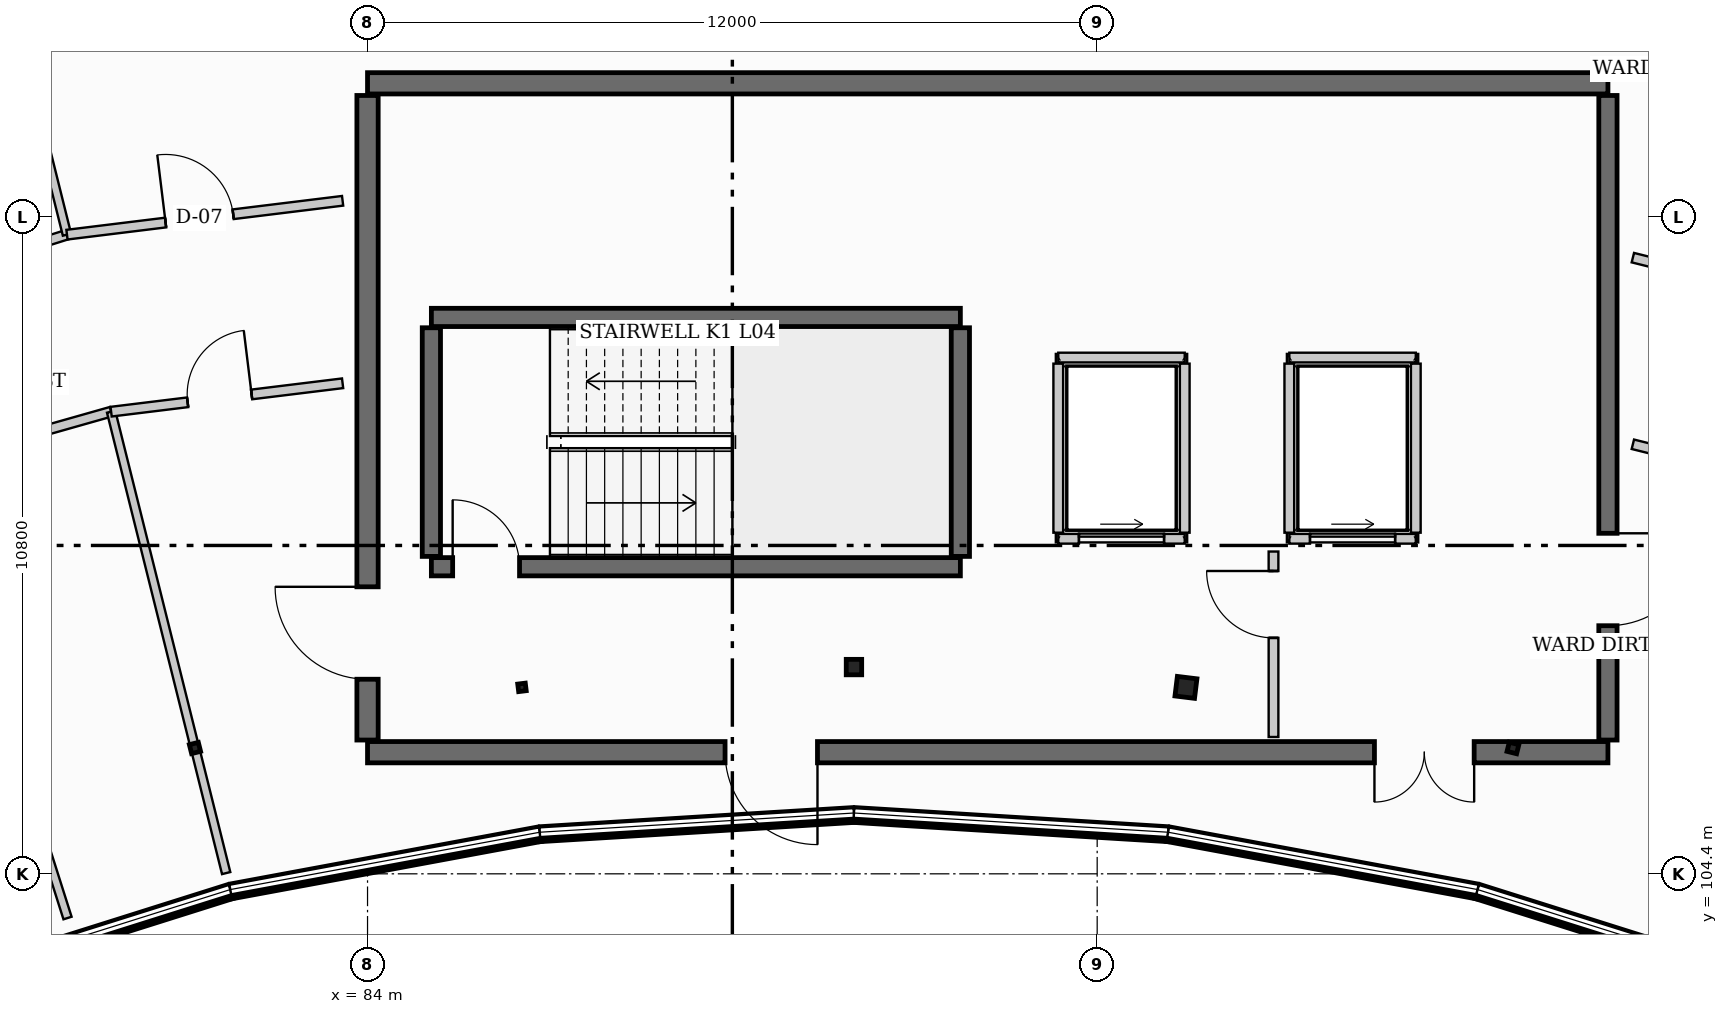
"""IFC4 building model, lengths in metres.
Left out: names, types, materials, properties, quantities, classifications, styles, units other than length and angle.
Written with IfcOpenShell. Run it as: python <this file> out.ifc"""

import sys

from ifc_helpers import new_model, si_unit, direction, frame, frame_2d, origin, origin_2d, place, context, subcontext, project, spatial, rectangle, hollow_rectangle, hollow_circle, i_section, extrude, element, fill, save


model = new_model("IFC4")
c1 = context("Model", 3, precision=1e-05, world=origin(), true_north=direction((0.0, 1.0)))
c2 = subcontext(c1, "Body", "Model", "MODEL_VIEW")
j1 = project(units=[si_unit("LENGTHUNIT", "METRE"), si_unit("PLANEANGLEUNIT", "RADIAN")], contexts=[c1])
p1 = place(None, origin())
s1 = spatial("IfcSite", under=j1, at=p1, CompositionType="ELEMENT")
p2 = place(p1, origin())
s2 = spatial("IfcBuilding", under=s1, at=p2, CompositionType="ELEMENT")
p3 = place(p2, frame((0.0, 0.0, 18.3)))
s3 = spatial("IfcBuildingStorey", under=s2, at=p3, CompositionType="ELEMENT", Elevation=18.3)
p4 = place(p3, frame((81.162, 106.469, 0.0), z_axis=(0.0, 0.0, 1.0), x_axis=(-0.2419218956, 0.970295726276, 0.0)))
e1 = element("IfcColumn", 1, at=p4, inside=s3, PredefinedType="COLUMN", context=c2, shape_type="SweptSolid", body=[
    extrude(i_section(OverallWidth=0.152, OverallDepth=0.152, WebThickness=0.006, FlangeThickness=0.007, at=origin_2d()), origin(), (0.0, 0.0, 1.0), 3.9),
])
p5 = place(p3, frame((86.54, 107.466, 0.0), z_axis=(0.0, 0.0, 1.0), x_axis=(-0.121869343405, 0.992546151641, 0.0)))
e2 = element("IfcColumn", 2, at=p5, inside=s3, PredefinedType="COLUMN", context=c2, shape_type="SweptSolid", body=[
    extrude(hollow_rectangle(XDim=0.125, YDim=0.125, WallThickness=0.006, at=origin_2d()), origin(), (0.0, 0.0, 1.0), 3.9),
])
p6 = place(p3, frame((92.0, 107.8, 0.0), z_axis=(0.0, 0.0, 1.0), x_axis=(0.0, 1.0, 0.0)))
e3 = element("IfcColumn", 3, at=p6, inside=s3, PredefinedType="COLUMN", context=c2, shape_type="SweptSolid", body=[
    extrude(i_section(OverallWidth=0.254, OverallDepth=0.254, WebThickness=0.009, FlangeThickness=0.014, at=origin_2d()), origin(), (0.0, 0.0, 1.0), 3.9),
])
p7 = place(p3, frame((97.46, 107.466, 0.0), z_axis=(0.0, 0.0, 1.0), x_axis=(0.121869343405, 0.992546151641, 0.0)))
e4 = element("IfcColumn", 4, at=p7, inside=s3, PredefinedType="COLUMN", context=c2, shape_type="SweptSolid", body=[
    extrude(hollow_circle(Radius=0.162, WallThickness=0.013, at=origin_2d()), origin(), (0.0, 0.0, 1.0), 3.9),
])
p8 = place(p3, frame((102.838, 106.469, 0.0), z_axis=(0.0, 0.0, 1.0), x_axis=(0.2419218956, 0.970295726276, 0.0)))
e5 = element("IfcColumn", 5, at=p8, inside=s3, PredefinedType="COLUMN", context=c2, shape_type="SweptSolid", body=[
    extrude(i_section(OverallWidth=0.154, OverallDepth=0.162, WebThickness=0.008, FlangeThickness=0.011, at=origin_2d()), origin(), (0.0, 0.0, 1.0), 3.9),
])
p9 = place(p3, frame((84.0, 117.4, 0.0), z_axis=(0.0, 0.0, 1.0), x_axis=(1.0, 0.0, 0.0)))
e6 = element("IfcWall", 6, at=p9, inside=s3, PredefinedType="SHEAR", context=c2, shape_type="SweptSolid", body=[
    extrude(rectangle(XDim=20.4, YDim=0.35, at=frame_2d((10.2, 0.0))), origin(), (0.0, 0.0, 1.0), 3.9),
])
p10 = place(p3, frame((104.4, 106.4, 0.0), z_axis=(0.0, 0.0, 1.0), x_axis=(-1.0, 0.0, 0.0)))
e7 = element("IfcWall", 7, at=p10, inside=s3, PredefinedType="SHEAR", context=c2, shape_type="SweptSolid", body=[
    extrude(rectangle(XDim=20.4, YDim=0.35, at=frame_2d((10.2, 0.0))), origin(), (0.0, 0.0, 1.0), 3.9),
])
p11 = place(p10, frame((2.2, 0.0, 0.0)))
e8 = element("IfcOpeningElement", 8, at=p11, cuts=e7, PredefinedType="OPENING", context=c2, shape_type="SweptSolid", body=[
    extrude(rectangle(XDim=1.64, YDim=2.2, at=frame_2d((0.82, 1.1))), frame((0.0, 0.185, 0.0), z_axis=(0.0, -1.0, 0.0), x_axis=(1.0, 0.0, 0.0)), (0.0, 0.0, 1.0), 0.37),
])
p12 = place(p10, frame((13.0, 0.0, 0.0)))
e9 = element("IfcOpeningElement", 9, at=p12, cuts=e7, PredefinedType="OPENING", context=c2, shape_type="SweptSolid", body=[
    extrude(rectangle(XDim=1.52, YDim=2.16, at=frame_2d((0.76, 1.08))), frame((0.0, 0.185, 0.0), z_axis=(0.0, -1.0, 0.0), x_axis=(1.0, 0.0, 0.0)), (0.0, 0.0, 1.0), 0.37),
])
p13 = place(p3, frame((84.0, 106.6, 0.0), z_axis=(0.0, 0.0, 1.0), x_axis=(0.0, 1.0, 0.0)))
e10 = element("IfcWall", 10, at=p13, inside=s3, PredefinedType="SHEAR", context=c2, shape_type="SweptSolid", body=[
    extrude(rectangle(XDim=10.6, YDim=0.35, at=frame_2d((5.3, 0.0))), origin(), (0.0, 0.0, 1.0), 3.9),
])
p14 = place(p13, frame((1.0, 0.0, 0.0)))
e11 = element("IfcOpeningElement", 11, at=p14, cuts=e10, PredefinedType="OPENING", context=c2, shape_type="SweptSolid", body=[
    extrude(rectangle(XDim=1.52, YDim=2.16, at=frame_2d((0.76, 1.08))), frame((0.0, 0.185, 0.0), z_axis=(0.0, -1.0, 0.0), x_axis=(1.0, 0.0, 0.0)), (0.0, 0.0, 1.0), 0.37),
])
p15 = place(p3, frame((104.4, 117.2, 0.0), z_axis=(0.0, 0.0, 1.0), x_axis=(0.0, -1.0, 0.0)))
e12 = element("IfcWall", 12, at=p15, inside=s3, PredefinedType="SHEAR", context=c2, shape_type="SweptSolid", body=[
    extrude(rectangle(XDim=10.6, YDim=0.3, at=frame_2d((5.3, 0.0))), origin(), (0.0, 0.0, 1.0), 3.9),
])
p16 = place(p15, frame((7.2, 0.0, 0.0)))
e13 = element("IfcOpeningElement", 13, at=p16, cuts=e12, PredefinedType="OPENING", context=c2, shape_type="SweptSolid", body=[
    extrude(rectangle(XDim=1.52, YDim=2.16, at=frame_2d((0.76, 1.08))), frame((0.0, 0.16, 0.0), z_axis=(0.0, -1.0, 0.0), x_axis=(1.0, 0.0, 0.0)), (0.0, 0.0, 1.0), 0.32),
])
p17 = place(p3, frame((85.05, 109.45, 0.0), z_axis=(0.0, 0.0, 1.0), x_axis=(1.0, 0.0, 0.0)))
e14 = element("IfcWall", 14, at=p17, inside=s3, PredefinedType="SHEAR", context=c2, shape_type="SweptSolid", body=[
    extrude(rectangle(XDim=8.7, YDim=0.3, at=frame_2d((4.35, 0.0))), origin(), (0.0, 0.0, 1.0), 3.9),
])
p18 = place(p17, frame((0.35, 0.0, 0.0)))
e15 = element("IfcOpeningElement", 15, at=p18, cuts=e14, PredefinedType="OPENING", context=c2, shape_type="SweptSolid", body=[
    extrude(rectangle(XDim=1.1, YDim=2.15, at=frame_2d((0.55, 1.075))), frame((0.0, 0.16, 0.0), z_axis=(0.0, -1.0, 0.0), x_axis=(1.0, 0.0, 0.0)), (0.0, 0.0, 1.0), 0.32),
])
p19 = place(p3, frame((93.75, 113.55, 0.0), z_axis=(0.0, 0.0, 1.0), x_axis=(-1.0, 0.0, 0.0)))
e16 = element("IfcWall", 16, at=p19, inside=s3, PredefinedType="SHEAR", context=c2, shape_type="SweptSolid", body=[
    extrude(rectangle(XDim=8.7, YDim=0.3, at=frame_2d((4.35, 0.0))), origin(), (0.0, 0.0, 1.0), 3.9),
])
for number, where, z_axis, x_axis in (
    (17, (85.05, 109.62, 0.0), (0.0, 0.0, 1.0), (0.0, 1.0, 0.0)),
    (18, (93.75, 109.62, 0.0), (0.0, 0.0, 1.0), (0.0, 1.0, 0.0)),
):
    element("IfcWall", number, at=place(p3, frame(where, z_axis=z_axis, x_axis=x_axis)), inside=s3, PredefinedType="SHEAR", context=c2, shape_type="SweptSolid", body=[
        extrude(rectangle(XDim=3.76, YDim=0.3, at=frame_2d((1.88, 0.0))), origin(), (0.0, 0.0, 1.0), 3.9),
    ])
p20 = place(p3, frame((81.743, 104.141, 0.0), z_axis=(0.0, 0.0, 1.0), x_axis=(-0.953706582316, -0.300738681994, 0.0)))
e19 = element("IfcWall", 19, at=p20, inside=s3, PredefinedType="STANDARD", context=c2, shape_type="SweptSolid", body=[
    extrude(rectangle(XDim=5.178, YDim=0.22, at=frame_2d((2.589, 0.0))), origin(), (0.0, 0.0, 1.0), 1.05),
])
for number, where, z_axis, x_axis in (
    (20, (86.833, 105.084, 0.0), (0.0, 0.0, 1.0), (-0.983, -0.182, 0.0)),
    (21, (92.0, 105.4, 0.0), (0.0, 0.0, 1.0), (-0.998, -0.061, 0.0)),
    (22, (97.167, 105.084, 0.0), (0.0, 0.0, 1.0), (-0.998, 0.061, 0.0)),
    (23, (102.257, 104.141, 0.0), (0.0, 0.0, 1.0), (-0.983, 0.182, 0.0)),
):
    element("IfcWall", number, at=place(p3, frame(where, z_axis=z_axis, x_axis=x_axis)), inside=s3, PredefinedType="STANDARD", context=c2, shape_type="SweptSolid", body=[
        extrude(rectangle(XDim=5.177, YDim=0.22, at=frame_2d((2.588, 0.0))), origin(), (0.0, 0.0, 1.0), 1.05),
    ])
p21 = place(p3, frame((107.195, 102.584, 0.0), z_axis=(0.0, 0.0, 1.0), x_axis=(-0.953706582316, 0.300738681994, 0.0)))
e24 = element("IfcWall", 24, at=p21, inside=s3, PredefinedType="STANDARD", context=c2, shape_type="SweptSolid", body=[
    extrude(rectangle(XDim=5.178, YDim=0.22, at=frame_2d((2.589, 0.0))), origin(), (0.0, 0.0, 1.0), 1.05),
])
p22 = place(p3, frame((95.36, 109.91, 0.0), z_axis=(0.0, 0.0, 1.0), x_axis=(1.0, 0.0, 0.0)))
e25 = element("IfcWall", 25, at=p22, inside=s3, PredefinedType="PARTITIONING", context=c2, shape_type="SweptSolid", body=[
    extrude(rectangle(XDim=2.08, YDim=0.16, at=frame_2d((1.04, 0.0))), origin(), (0.0, 0.0, 1.0), 3.54),
])
p23 = place(p22, frame((0.34, 0.0, 0.0)))
e26 = element("IfcOpeningElement", 26, at=p23, cuts=e25, PredefinedType="OPENING", context=c2, shape_type="SweptSolid", body=[
    extrude(rectangle(XDim=1.4, YDim=2.2, at=frame_2d((0.7, 1.1))), frame((0.0, 0.09, 0.0), z_axis=(0.0, -1.0, 0.0), x_axis=(1.0, 0.0, 0.0)), (0.0, 0.0, 1.0), 0.18),
])
p24 = place(p3, frame((97.44, 112.89, 0.0), z_axis=(0.0, 0.0, 1.0), x_axis=(-1.0, 0.0, 0.0)))
e27 = element("IfcWall", 27, at=p24, inside=s3, PredefinedType="PARTITIONING", context=c2, shape_type="SweptSolid", body=[
    extrude(rectangle(XDim=2.08, YDim=0.16, at=frame_2d((1.04, 0.0))), origin(), (0.0, 0.0, 1.0), 3.54),
])
for number, where, z_axis, x_axis in (
    (28, (95.36, 112.79, 0.0), (0.0, 0.0, 1.0), (0.0, -1.0, 0.0)),
    (29, (97.44, 110.01, 0.0), (0.0, 0.0, 1.0), (0.0, 1.0, 0.0)),
):
    element("IfcWall", number, at=place(p3, frame(where, z_axis=z_axis, x_axis=x_axis)), inside=s3, PredefinedType="PARTITIONING", context=c2, shape_type="SweptSolid", body=[
        extrude(rectangle(XDim=2.78, YDim=0.16, at=frame_2d((1.39, 0.0))), origin(), (0.0, 0.0, 1.0), 3.54),
    ])
p25 = place(p3, frame((99.16, 109.91, 0.0), z_axis=(0.0, 0.0, 1.0), x_axis=(1.0, 0.0, 0.0)))
e30 = element("IfcWall", 30, at=p25, inside=s3, PredefinedType="PARTITIONING", context=c2, shape_type="SweptSolid", body=[
    extrude(rectangle(XDim=2.08, YDim=0.16, at=frame_2d((1.04, 0.0))), origin(), (0.0, 0.0, 1.0), 3.54),
])
p26 = place(p25, frame((0.34, 0.0, 0.0)))
e31 = element("IfcOpeningElement", 31, at=p26, cuts=e30, PredefinedType="OPENING", context=c2, shape_type="SweptSolid", body=[
    extrude(rectangle(XDim=1.4, YDim=2.2, at=frame_2d((0.7, 1.1))), frame((0.0, 0.09, 0.0), z_axis=(0.0, -1.0, 0.0), x_axis=(1.0, 0.0, 0.0)), (0.0, 0.0, 1.0), 0.18),
])
p27 = place(p3, frame((101.24, 112.89, 0.0), z_axis=(0.0, 0.0, 1.0), x_axis=(-1.0, 0.0, 0.0)))
e32 = element("IfcWall", 32, at=p27, inside=s3, PredefinedType="PARTITIONING", context=c2, shape_type="SweptSolid", body=[
    extrude(rectangle(XDim=2.08, YDim=0.16, at=frame_2d((1.04, 0.0))), origin(), (0.0, 0.0, 1.0), 3.54),
])
for number, where, z_axis, x_axis in (
    (33, (99.16, 112.79, 0.0), (0.0, 0.0, 1.0), (0.0, -1.0, 0.0)),
    (34, (101.24, 110.01, 0.0), (0.0, 0.0, 1.0), (0.0, 1.0, 0.0)),
):
    element("IfcWall", number, at=place(p3, frame(where, z_axis=z_axis, x_axis=x_axis)), inside=s3, PredefinedType="PARTITIONING", context=c2, shape_type="SweptSolid", body=[
        extrude(rectangle(XDim=2.78, YDim=0.16, at=frame_2d((1.39, 0.0))), origin(), (0.0, 0.0, 1.0), 3.54),
    ])
p28 = place(p3, frame((98.9, 106.65, 0.0), z_axis=(0.0, 0.0, 1.0), x_axis=(0.0, 1.0, 0.0)))
e35 = element("IfcWall", 35, at=p28, inside=s3, PredefinedType="PARTITIONING", context=c2, shape_type="SweptSolid", body=[
    extrude(rectangle(XDim=3.05, YDim=0.16, at=frame_2d((1.525, 0.0))), origin(), (0.0, 0.0, 1.0), 3.295),
])
p29 = place(p28, frame((1.63, 0.0, 0.0)))
e36 = element("IfcOpeningElement", 36, at=p29, cuts=e35, PredefinedType="OPENING", context=c2, shape_type="SweptSolid", body=[
    extrude(rectangle(XDim=1.1, YDim=2.15, at=frame_2d((0.55, 1.075))), frame((0.0, 0.09, 0.0), z_axis=(0.0, -1.0, 0.0), x_axis=(1.0, 0.0, 0.0)), (0.0, 0.0, 1.0), 0.18),
])
p30 = place(p3, frame((72.827, 112.947, 0.0), z_axis=(0.0, 0.0, 1.0), x_axis=(0.953736183483, 0.30064479426, 0.0)))
e37 = element("IfcWall", 37, at=p30, inside=s3, PredefinedType="PARTITIONING", context=c2, shape_type="SweptSolid", body=[
    extrude(rectangle(XDim=6.532, YDim=0.16, at=frame_2d((3.266, 0.0))), origin(), (0.0, 0.0, 1.0), 2.933),
])
p31 = place(p30, frame((4.632, 0.0, 0.0)))
e38 = element("IfcOpeningElement", 38, at=p31, cuts=e37, PredefinedType="OPENING", context=c2, shape_type="SweptSolid", body=[
    extrude(rectangle(XDim=1.36, YDim=2.18, at=frame_2d((0.68, 1.09))), frame((0.0, 0.09, 0.0), z_axis=(0.0, -1.0, 0.0), x_axis=(1.0, 0.0, 0.0)), (0.0, 0.0, 1.0), 0.18),
])
p32 = place(p3, frame((79.057, 114.911, 0.0), z_axis=(0.0, 0.0, 1.0), x_axis=(-0.241911207257, 0.970298391117, 0.0)))
e39 = element("IfcWall", 39, at=p32, inside=s3, PredefinedType="PARTITIONING", context=c2, shape_type="SweptSolid", body=[
    extrude(rectangle(XDim=7.82, YDim=0.14, at=frame_2d((3.91, 0.0))), origin(), (0.0, 0.0, 1.0), 2.938),
])
p33 = place(p3, frame((76.697, 111.125, 0.0), z_axis=(0.0, 0.0, 1.0), x_axis=(0.302952343331, -0.95300570705, 0.0)))
e40 = element("IfcWall", 40, at=p33, inside=s3, PredefinedType="PARTITIONING", context=c2, shape_type="SweptSolid", body=[
    extrude(rectangle(XDim=7.819, YDim=0.14, at=frame_2d((3.91, 0.0))), origin(), (0.0, 0.0, 1.0), 3.241),
])
p34 = place(p3, frame((76.697, 111.125, 0.0), z_axis=(0.0, 0.0, 1.0), x_axis=(0.962073473599, 0.272790453274, 0.0)))
e41 = element("IfcWall", 41, at=p34, inside=s3, PredefinedType="PARTITIONING", context=c2, shape_type="SweptSolid", body=[
    extrude(rectangle(XDim=3.208, YDim=0.16, at=frame_2d((1.604, 0.0))), origin(), (0.0, 0.0, 1.0), 2.938),
])
p35 = place(p34, frame((0.45, 0.0, 0.0)))
e42 = element("IfcOpeningElement", 42, at=p35, cuts=e41, PredefinedType="OPENING", context=c2, shape_type="SweptSolid", body=[
    extrude(rectangle(XDim=1.2, YDim=2.12, at=frame_2d((0.6, 1.06))), frame((0.0, 0.09, 0.0), z_axis=(0.0, -1.0, 0.0), x_axis=(1.0, 0.0, 0.0)), (0.0, 0.0, 1.0), 0.18),
])
p36 = place(p3, frame((79.783, 112.0, 0.0), z_axis=(0.0, 0.0, 1.0), x_axis=(0.241947927131, -0.970289235515, 0.0)))
e43 = element("IfcWall", 43, at=p36, inside=s3, PredefinedType="PARTITIONING", context=c2, shape_type="SweptSolid", body=[
    extrude(rectangle(XDim=7.82, YDim=0.14, at=frame_2d((3.91, 0.0))), origin(), (0.0, 0.0, 1.0), 2.938),
])
p37 = place(p3, frame((79.057, 114.911, 0.0), z_axis=(0.0, 0.0, 1.0), x_axis=(0.992532332473, 0.121981838793, 0.0)))
e44 = element("IfcWall", 44, at=p37, inside=s3, PredefinedType="PARTITIONING", context=c2, shape_type="SweptSolid", body=[
    extrude(rectangle(XDim=4.567, YDim=0.16, at=frame_2d((2.284, 0.0))), origin(), (0.0, 0.0, 1.0), 2.938),
])
p38 = place(p37, frame((1.634, 0.0, 0.0)))
e45 = element("IfcOpeningElement", 45, at=p38, cuts=e44, PredefinedType="OPENING", context=c2, shape_type="SweptSolid", body=[
    extrude(rectangle(XDim=1.12, YDim=2.08, at=frame_2d((0.56, 1.04))), frame((0.0, 0.09, 0.0), z_axis=(0.0, -1.0, 0.0), x_axis=(1.0, 0.0, 0.0)), (0.0, 0.0, 1.0), 0.18),
])
p39 = place(p3, frame((79.783, 112.0, 0.0), z_axis=(0.0, 0.0, 1.0), x_axis=(0.992559253302, 0.121762591482, 0.0)))
e46 = element("IfcWall", 46, at=p39, inside=s3, PredefinedType="PARTITIONING", context=c2, shape_type="SweptSolid", body=[
    extrude(rectangle(XDim=3.836, YDim=0.16, at=frame_2d((1.918, 0.0))), origin(), (0.0, 0.0, 1.0), 2.938),
])
p40 = place(p39, frame((1.268, 0.0, 0.0)))
e47 = element("IfcOpeningElement", 47, at=p40, cuts=e46, PredefinedType="OPENING", context=c2, shape_type="SweptSolid", body=[
    extrude(rectangle(XDim=1.06, YDim=2.1, at=frame_2d((0.53, 1.05))), frame((0.0, 0.09, 0.0), z_axis=(0.0, -1.0, 0.0), x_axis=(1.0, 0.0, 0.0)), (0.0, 0.0, 1.0), 0.18),
])
p41 = place(p3, frame((104.81, 114.533, 0.0), z_axis=(0.0, 0.0, 1.0), x_axis=(0.970315261497, -0.241843530625, 0.0)))
e48 = element("IfcWall", 48, at=p41, inside=s3, PredefinedType="PARTITIONING", context=c2, shape_type="SweptSolid", body=[
    extrude(rectangle(XDim=6.558, YDim=0.16, at=frame_2d((3.279, 0.0))), origin(), (0.0, 0.0, 1.0), 3.085),
])
p42 = place(p41, frame((2.629, 0.0, 0.0)))
e49 = element("IfcOpeningElement", 49, at=p42, cuts=e48, PredefinedType="OPENING", context=c2, shape_type="SweptSolid", body=[
    extrude(rectangle(XDim=1.02, YDim=2.08, at=frame_2d((0.51, 1.04))), frame((0.0, 0.09, 0.0), z_axis=(0.0, -1.0, 0.0), x_axis=(1.0, 0.0, 0.0)), (0.0, 0.0, 1.0), 0.18),
])
p43 = place(p3, frame((104.81, 111.464, 0.0), z_axis=(0.0, 0.0, 1.0), x_axis=(0.970308293834, -0.241871484298, 0.0)))
e50 = element("IfcWall", 50, at=p43, inside=s3, PredefinedType="PARTITIONING", context=c2, shape_type="SweptSolid", body=[
    extrude(rectangle(XDim=5.45, YDim=0.16, at=frame_2d((2.725, 0.0))), origin(), (0.0, 0.0, 1.0), 3.088),
])
p44 = place(p43, frame((2.075, 0.0, 0.0)))
e51 = element("IfcOpeningElement", 51, at=p44, cuts=e50, PredefinedType="OPENING", context=c2, shape_type="SweptSolid", body=[
    extrude(rectangle(XDim=0.96, YDim=2.06, at=frame_2d((0.48, 1.03))), frame((0.0, 0.09, 0.0), z_axis=(0.0, -1.0, 0.0), x_axis=(1.0, 0.0, 0.0)), (0.0, 0.0, 1.0), 0.18),
])
p45 = place(p23, origin())
e52 = element("IfcDoor", 52, at=p45, inside=s3, OperationType="SLIDING_TO_RIGHT", PredefinedType="DOOR", context=c2, shape_type="SweptSolid", body=[
    extrude(rectangle(XDim=1.4, YDim=2.2, at=frame_2d((0.7, 1.1))), frame((0.0, 0.025, 0.0), z_axis=(0.0, -1.0, 0.0), x_axis=(1.0, 0.0, 0.0)), (0.0, 0.0, 1.0), 0.05),
])
fill(e26, e52)
p46 = place(p26, origin())
e53 = element("IfcDoor", 53, at=p46, inside=s3, OperationType="SLIDING_TO_RIGHT", PredefinedType="DOOR", context=c2, shape_type="SweptSolid", body=[
    extrude(rectangle(XDim=1.4, YDim=2.2, at=frame_2d((0.7, 1.1))), frame((0.0, 0.025, 0.0), z_axis=(0.0, -1.0, 0.0), x_axis=(1.0, 0.0, 0.0)), (0.0, 0.0, 1.0), 0.05),
])
fill(e31, e53)
p47 = place(p18, origin())
e54 = element("IfcDoor", 54, at=p47, inside=s3, OperationType="SINGLE_SWING_LEFT", PredefinedType="DOOR", context=c2, shape_type="SweptSolid", body=[
    extrude(rectangle(XDim=1.1, YDim=2.15, at=frame_2d((0.55, 1.075))), frame((0.0, 0.025, 0.0), z_axis=(0.0, -1.0, 0.0), x_axis=(1.0, 0.0, 0.0)), (0.0, 0.0, 1.0), 0.05),
])
fill(e15, e54)
p48 = place(p11, origin())
e55 = element("IfcDoor", 55, at=p48, inside=s3, OperationType="DOUBLE_DOOR_SINGLE_SWING", PredefinedType="DOOR", context=c2, shape_type="SweptSolid", body=[
    extrude(rectangle(XDim=1.64, YDim=2.2, at=frame_2d((0.82, 1.1))), frame((0.0, 0.025, 0.0), z_axis=(0.0, -1.0, 0.0), x_axis=(1.0, 0.0, 0.0)), (0.0, 0.0, 1.0), 0.05),
])
fill(e8, e55)
p49 = place(p12, origin())
e56 = element("IfcDoor", 56, at=p49, inside=s3, OperationType="SINGLE_SWING_LEFT", PredefinedType="DOOR", context=c2, shape_type="SweptSolid", body=[
    extrude(rectangle(XDim=1.52, YDim=2.16, at=frame_2d((0.76, 1.08))), frame((0.0, 0.025, 0.0), z_axis=(0.0, -1.0, 0.0), x_axis=(1.0, 0.0, 0.0)), (0.0, 0.0, 1.0), 0.05),
])
fill(e9, e56)
p50 = place(p14, origin())
e57 = element("IfcDoor", 57, at=p50, inside=s3, OperationType="SINGLE_SWING_RIGHT", PredefinedType="DOOR", context=c2, shape_type="SweptSolid", body=[
    extrude(rectangle(XDim=1.52, YDim=2.16, at=frame_2d((0.76, 1.08))), frame((0.0, 0.025, 0.0), z_axis=(0.0, -1.0, 0.0), x_axis=(1.0, 0.0, 0.0)), (0.0, 0.0, 1.0), 0.05),
])
fill(e11, e57)
p51 = place(p16, origin())
e58 = element("IfcDoor", 58, at=p51, inside=s3, OperationType="SINGLE_SWING_LEFT", PredefinedType="DOOR", context=c2, shape_type="SweptSolid", body=[
    extrude(rectangle(XDim=1.52, YDim=2.16, at=frame_2d((0.76, 1.08))), frame((0.0, 0.025, 0.0), z_axis=(0.0, -1.0, 0.0), x_axis=(1.0, 0.0, 0.0)), (0.0, 0.0, 1.0), 0.05),
])
fill(e13, e58)
p52 = place(p29, origin())
e59 = element("IfcDoor", 59, at=p52, inside=s3, OperationType="SINGLE_SWING_RIGHT", PredefinedType="DOOR", context=c2, shape_type="SweptSolid", body=[
    extrude(rectangle(XDim=1.1, YDim=2.15, at=frame_2d((0.55, 1.075))), frame((0.0, 0.025, 0.0), z_axis=(0.0, -1.0, 0.0), x_axis=(1.0, 0.0, 0.0)), (0.0, 0.0, 1.0), 0.05),
])
fill(e36, e59)
p53 = place(p38, origin())
e60 = element("IfcDoor", 60, at=p53, inside=s3, OperationType="SINGLE_SWING_LEFT", PredefinedType="DOOR", context=c2, shape_type="SweptSolid", body=[
    extrude(rectangle(XDim=1.12, YDim=2.08, at=frame_2d((0.56, 1.04))), frame((0.0, 0.025, 0.0), z_axis=(0.0, -1.0, 0.0), x_axis=(1.0, 0.0, 0.0)), (0.0, 0.0, 1.0), 0.05),
])
fill(e45, e60)
p54 = place(p40, origin())
e61 = element("IfcDoor", 61, at=p54, inside=s3, OperationType="SINGLE_SWING_RIGHT", PredefinedType="DOOR", context=c2, shape_type="SweptSolid", body=[
    extrude(rectangle(XDim=1.06, YDim=2.1, at=frame_2d((0.53, 1.05))), frame((0.0, 0.025, 0.0), z_axis=(0.0, -1.0, 0.0), x_axis=(1.0, 0.0, 0.0)), (0.0, 0.0, 1.0), 0.05),
])
fill(e47, e61)
save(model, sys.argv[1])
